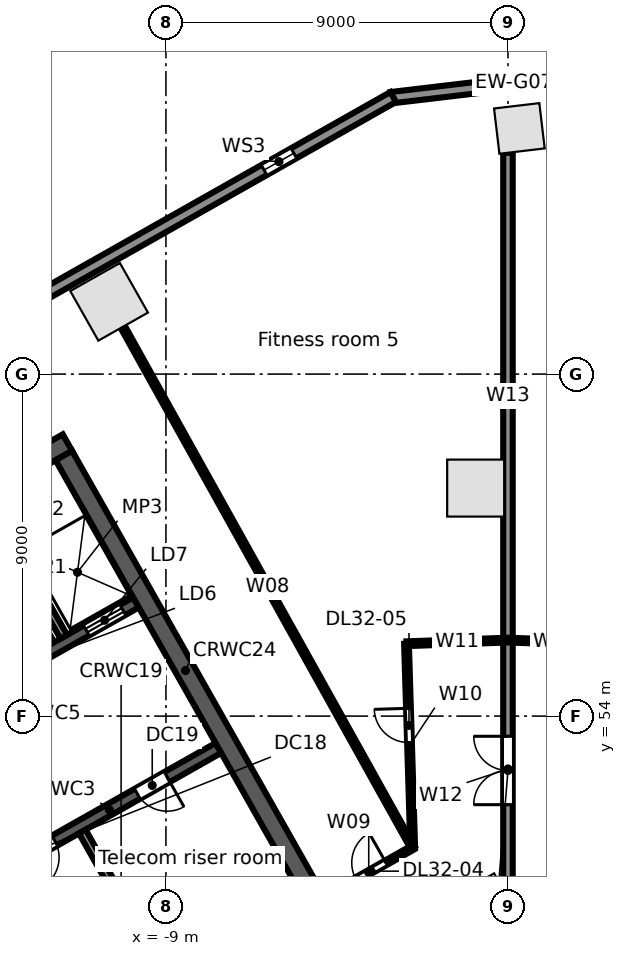
"""IFC4 building model, lengths in metres.
Left out: names, types, materials, properties, quantities, classifications, styles, units other than length and angle.
Written with IfcOpenShell. Run it as: python <this file> out.ifc"""

import sys

from ifc_helpers import new_model, si_unit, direction, frame, frame_2d, origin, origin_2d, place, context, subcontext, project, spatial, rectangle, extrude, element, fill, save


model = new_model("IFC4")
c1 = context("Model", 3, precision=1e-05, world=origin(), true_north=direction((0.0, 1.0)))
c2 = subcontext(c1, "Body", "Model", "MODEL_VIEW")
j1 = project(units=[si_unit("LENGTHUNIT", "METRE"), si_unit("PLANEANGLEUNIT", "RADIAN")], contexts=[c1])
p1 = place(None, origin())
s1 = spatial("IfcSite", under=j1, at=p1, CompositionType="ELEMENT")
p2 = place(p1, origin())
s2 = spatial("IfcBuilding", under=s1, at=p2, CompositionType="ELEMENT")
p3 = place(p2, frame((0.0, 0.0, 162.9)))
s3 = spatial("IfcBuildingStorey", under=s2, at=p3, CompositionType="ELEMENT", Elevation=162.9)
p4 = place(p3, frame((0.3, 69.464, 0.0), z_axis=(0.0, 0.0, 1.0), x_axis=(-0.993068456955, -0.117537397458, 0.0)))
e1 = element("IfcColumn", 1, at=p4, inside=s3, PredefinedType="COLUMN", context=c2, shape_type="SweptSolid", body=[
    extrude(rectangle(XDim=1.2, YDim=1.2, at=origin_2d()), origin(), (0.0, 0.0, 1.0), 4.0),
])
p5 = place(p3, frame((-10.495, 64.902, 0.0), z_axis=(0.0, 0.0, 1.0), x_axis=(-0.87035569594, -0.492423560103, 0.0)))
e2 = element("IfcColumn", 2, at=p5, inside=s3, PredefinedType="COLUMN", context=c2, shape_type="SweptSolid", body=[
    extrude(rectangle(XDim=1.5, YDim=1.5, at=origin_2d()), origin(), (0.0, 0.0, 1.0), 4.0),
])
p6 = place(p3, frame((-0.591, 49.044, 0.0), z_axis=(0.0, 0.0, 1.0), x_axis=(0.87035569594, 0.492423560103, 0.0)))
e3 = element("IfcColumn", 3, at=p6, inside=s3, PredefinedType="COLUMN", context=c2, shape_type="SweptSolid", body=[
    extrude(rectangle(XDim=1.2, YDim=1.2, at=origin_2d()), origin(), (0.0, 0.0, 1.0), 4.0),
])
p7 = place(p3, frame((-0.85, 60.0, 0.0), z_axis=(0.0, 0.0, 1.0), x_axis=(0.0, 1.0, 0.0)))
e4 = element("IfcColumn", 4, at=p7, inside=s3, PredefinedType="COLUMN", context=c2, shape_type="SweptSolid", body=[
    extrude(rectangle(XDim=1.5, YDim=1.5, at=origin_2d()), origin(), (0.0, 0.0, 1.0), 4.0),
])
p8 = place(p3, frame((-3.076, 70.273, 0.0), z_axis=(0.0, 0.0, 1.0), x_axis=(0.993067743007, 0.117543429416, 0.0)))
e5 = element("IfcWall", 5, at=p8, inside=s3, PredefinedType="STANDARD", context=c2, shape_type="SweptSolid", body=[
    extrude(rectangle(XDim=6.516, YDim=0.3, at=frame_2d((3.258, 0.0))), origin(), (0.0, 0.0, 1.0), 3.68),
])
p9 = place(p3, frame((-58.745, 38.764, 0.0), z_axis=(0.0, 0.0, 1.0), x_axis=(0.870355811726, 0.492423355453, 0.0)))
e6 = element("IfcWall", 6, at=p9, inside=s3, PredefinedType="STANDARD", context=c2, shape_type="SweptSolid", body=[
    extrude(rectangle(XDim=64.025, YDim=0.3, at=frame_2d((32.013, 0.0))), origin(), (0.0, 0.0, 1.0), 3.68),
])
p10 = place(p9, frame((60.122, 0.0, 0.6)))
e7 = element("IfcOpeningElement", 7, at=p10, cuts=e6, PredefinedType="OPENING", context=c2, shape_type="SweptSolid", body=[
    extrude(rectangle(XDim=0.9, YDim=2.4, at=frame_2d((0.45, 1.2))), frame((0.0, 0.16, 0.0), z_axis=(0.0, -1.0, 0.0), x_axis=(1.0, 0.0, 0.0)), (0.0, 0.0, 1.0), 0.32),
])
p11 = place(p9, frame((50.992, 0.0, 0.6)))
e8 = element("IfcOpeningElement", 8, at=p11, cuts=e6, PredefinedType="OPENING", context=c2, shape_type="SweptSolid", body=[
    extrude(rectangle(XDim=0.9, YDim=2.4, at=frame_2d((0.45, 1.2))), frame((0.0, 0.16, 0.0), z_axis=(0.0, -1.0, 0.0), x_axis=(1.0, 0.0, 0.0)), (0.0, 0.0, 1.0), 0.32),
])
p12 = place(p9, frame((41.862, 0.0, 0.6)))
e9 = element("IfcOpeningElement", 9, at=p12, cuts=e6, PredefinedType="OPENING", context=c2, shape_type="SweptSolid", body=[
    extrude(rectangle(XDim=0.9, YDim=2.4, at=frame_2d((0.45, 1.2))), frame((0.0, 0.16, 0.0), z_axis=(0.0, -1.0, 0.0), x_axis=(1.0, 0.0, 0.0)), (0.0, 0.0, 1.0), 0.32),
])
p13 = place(p9, frame((32.732, 0.0, 0.6)))
e10 = element("IfcOpeningElement", 10, at=p13, cuts=e6, PredefinedType="OPENING", context=c2, shape_type="SweptSolid", body=[
    extrude(rectangle(XDim=0.9, YDim=2.4, at=frame_2d((0.45, 1.2))), frame((0.0, 0.16, 0.0), z_axis=(0.0, -1.0, 0.0), x_axis=(1.0, 0.0, 0.0)), (0.0, 0.0, 1.0), 0.32),
])
p14 = place(p9, frame((23.602, 0.0, 0.6)))
e11 = element("IfcOpeningElement", 11, at=p14, cuts=e6, PredefinedType="OPENING", context=c2, shape_type="SweptSolid", body=[
    extrude(rectangle(XDim=0.9, YDim=2.4, at=frame_2d((0.45, 1.2))), frame((0.0, 0.16, 0.0), z_axis=(0.0, -1.0, 0.0), x_axis=(1.0, 0.0, 0.0)), (0.0, 0.0, 1.0), 0.32),
])
p15 = place(p9, frame((14.472, 0.0, 0.6)))
e12 = element("IfcOpeningElement", 12, at=p15, cuts=e6, PredefinedType="OPENING", context=c2, shape_type="SweptSolid", body=[
    extrude(rectangle(XDim=0.9, YDim=2.4, at=frame_2d((0.45, 1.2))), frame((0.0, 0.16, 0.0), z_axis=(0.0, -1.0, 0.0), x_axis=(1.0, 0.0, 0.0)), (0.0, 0.0, 1.0), 0.32),
])
p16 = place(p9, frame((5.342, 0.0, 0.6)))
e13 = element("IfcOpeningElement", 13, at=p16, cuts=e6, PredefinedType="OPENING", context=c2, shape_type="SweptSolid", body=[
    extrude(rectangle(XDim=0.9, YDim=2.4, at=frame_2d((0.45, 1.2))), frame((0.0, 0.16, 0.0), z_axis=(0.0, -1.0, 0.0), x_axis=(1.0, 0.0, 0.0)), (0.0, 0.0, 1.0), 0.32),
])
p17 = place(p3, frame((-13.365, 49.911, 0.0), z_axis=(0.0, 0.0, 1.0), x_axis=(0.870356769198, 0.492421663121, 0.0)))
e14 = element("IfcWall", 14, at=p17, inside=s3, PredefinedType="SOLIDWALL", context=c2, shape_type="SweptSolid", body=[
    extrude(rectangle(XDim=6.6, YDim=0.3, at=frame_2d((3.3, 0.0))), origin(), (0.0, 0.0, 1.0), 3.68),
])
p18 = place(p17, frame((0.75, 0.0, 0.0)))
e15 = element("IfcOpeningElement", 15, at=p18, cuts=e14, PredefinedType="OPENING", context=c2, shape_type="SweptSolid", body=[
    extrude(rectangle(XDim=0.9, YDim=2.1, at=frame_2d((0.45, 1.05))), frame((0.0, 0.16, 0.0), z_axis=(0.0, -1.0, 0.0), x_axis=(1.0, 0.0, 0.0)), (0.0, 0.0, 1.0), 0.32),
])
p19 = place(p17, frame((4.15, 0.0, 0.0)))
e16 = element("IfcOpeningElement", 16, at=p19, cuts=e14, PredefinedType="OPENING", context=c2, shape_type="SweptSolid", body=[
    extrude(rectangle(XDim=0.9, YDim=2.1, at=frame_2d((0.45, 1.05))), frame((0.0, 0.16, 0.0), z_axis=(0.0, -1.0, 0.0), x_axis=(1.0, 0.0, 0.0)), (0.0, 0.0, 1.0), 0.32),
])
p20 = place(p3, frame((-15.618, 53.691, 0.0), z_axis=(0.0, 0.0, 1.0), x_axis=(0.870363236066, 0.492410232738, 0.0)))
e17 = element("IfcWall", 17, at=p20, inside=s3, PredefinedType="SOLIDWALL", context=c2, shape_type="SweptSolid", body=[
    extrude(rectangle(XDim=6.7, YDim=0.3, at=frame_2d((3.35, 0.0))), origin(), (0.0, 0.0, 1.0), 3.68),
])
p21 = place(p20, frame((0.6, 0.0, 0.0)))
e18 = element("IfcOpeningElement", 18, at=p21, cuts=e17, PredefinedType="OPENING", context=c2, shape_type="SweptSolid", body=[
    extrude(rectangle(XDim=1.1, YDim=2.1, at=frame_2d((0.55, 1.05))), frame((0.0, 0.16, 0.0), z_axis=(0.0, -1.0, 0.0), x_axis=(1.0, 0.0, 0.0)), (0.0, 0.0, 1.0), 0.32),
])
p22 = place(p20, frame((2.9, 0.0, 0.0)))
e19 = element("IfcOpeningElement", 19, at=p22, cuts=e17, PredefinedType="OPENING", context=c2, shape_type="SweptSolid", body=[
    extrude(rectangle(XDim=1.1, YDim=2.1, at=frame_2d((0.55, 1.05))), frame((0.0, 0.16, 0.0), z_axis=(0.0, -1.0, 0.0), x_axis=(1.0, 0.0, 0.0)), (0.0, 0.0, 1.0), 0.32),
])
p23 = place(p20, frame((5.2, 0.0, 0.0)))
e20 = element("IfcOpeningElement", 20, at=p23, cuts=e17, PredefinedType="OPENING", context=c2, shape_type="SweptSolid", body=[
    extrude(rectangle(XDim=1.1, YDim=2.1, at=frame_2d((0.55, 1.05))), frame((0.0, 0.16, 0.0), z_axis=(0.0, -1.0, 0.0), x_axis=(1.0, 0.0, 0.0)), (0.0, 0.0, 1.0), 0.32),
])
p24 = place(p3, frame((-24.647, 53.811, 0.0), z_axis=(0.0, 0.0, 1.0), x_axis=(0.87034965173, 0.492434243055, 0.0)))
e21 = element("IfcWall", 21, at=p24, inside=s3, PredefinedType="SOLIDWALL", context=c2, shape_type="SweptSolid", body=[
    extrude(rectangle(XDim=15.0, YDim=0.5, at=frame_2d((7.5, 0.0))), origin(), (0.0, 0.0, 1.0), 3.68),
])
p25 = place(p3, frame((-13.291, 49.781, 0.0), z_axis=(0.0, 0.0, 1.0), x_axis=(0.492396453737, -0.870371031427, 0.0)))
e22 = element("IfcWall", 22, at=p25, inside=s3, PredefinedType="SOLIDWALL", context=c2, shape_type="SweptSolid", body=[
    extrude(rectangle(XDim=4.15, YDim=0.3, at=frame_2d((2.075, 0.0))), origin(), (0.0, 0.0, 1.0), 3.68),
])
p26 = place(p3, frame((-11.202, 50.962, 0.0), z_axis=(0.0, 0.0, 1.0), x_axis=(0.492441017253, -0.870345818929, 0.0)))
e23 = element("IfcWall", 23, at=p26, inside=s3, PredefinedType="PARTITIONING", context=c2, shape_type="SweptSolid", body=[
    extrude(rectangle(XDim=4.15, YDim=0.2, at=frame_2d((2.075, 0.0))), origin(), (0.0, 0.0, 1.0), 3.68),
])
p27 = place(p3, frame((-13.732, 59.699, 0.0), z_axis=(0.0, 0.0, 1.0), x_axis=(0.492396453737, -0.870371031427, 0.0)))
e24 = element("IfcWall", 24, at=p27, inside=s3, PredefinedType="SOLIDWALL", context=c2, shape_type="SweptSolid", body=[
    extrude(rectangle(XDim=4.15, YDim=0.2, at=frame_2d((2.075, 0.0))), origin(), (0.0, 0.0, 1.0), 3.68),
])
p28 = place(p3, frame((-11.687, 60.856, 0.0), z_axis=(0.0, 0.0, 1.0), x_axis=(0.492427267353, -0.870353598469, 0.0)))
e25 = element("IfcWall", 25, at=p28, inside=s3, PredefinedType="SOLIDWALL", context=c2, shape_type="SweptSolid", body=[
    extrude(rectangle(XDim=13.0, YDim=0.5, at=frame_2d((6.5, 0.0))), origin(), (0.0, 0.0, 1.0), 3.68),
])
p29 = place(p3, frame((-10.137, 64.243, 0.0), z_axis=(0.0, 0.0, 1.0), x_axis=(0.486452862603, -0.873706822948, 0.0)))
e26 = element("IfcWall", 26, at=p29, inside=s3, PredefinedType="PARTITIONING", context=c2, shape_type="SweptSolid", body=[
    extrude(rectangle(XDim=15.685, YDim=0.125, at=frame_2d((7.842, 0.0))), origin(), (0.0, 0.0, 1.0), 2.748),
])
p30 = place(p3, frame((-4.821, 49.23, 0.0), z_axis=(0.0, 0.0, 1.0), x_axis=(0.870371217631, 0.492396124598, 0.0)))
e27 = element("IfcWall", 27, at=p30, inside=s3, PredefinedType="PARTITIONING", context=c2, shape_type="SweptSolid", body=[
    extrude(rectangle(XDim=2.659, YDim=0.125, at=frame_2d((1.329, 0.0))), origin(), (0.0, 0.0, 1.0), 3.68),
])
p31 = place(p30, frame((0.95, 0.0, 0.0)))
e28 = element("IfcOpeningElement", 28, at=p31, cuts=e27, PredefinedType="OPENING", context=c2, shape_type="SweptSolid", body=[
    extrude(rectangle(XDim=0.9, YDim=2.1, at=frame_2d((0.45, 1.05))), frame((0.0, 0.073, 0.0), z_axis=(0.0, -1.0, 0.0), x_axis=(1.0, 0.0, 0.0)), (0.0, 0.0, 1.0), 0.145),
])
p32 = place(p3, frame((-2.67, 55.904, 0.0), z_axis=(0.0, 0.0, 1.0), x_axis=(0.030338701418, -0.999539675649, 0.0)))
e29 = element("IfcWall", 29, at=p32, inside=s3, PredefinedType="PARTITIONING", context=c2, shape_type="SweptSolid", body=[
    extrude(rectangle(XDim=5.367, YDim=0.125, at=frame_2d((2.684, 0.0))), origin(), (0.0, 0.0, 1.0), 3.68),
])
p33 = place(p32, frame((1.7, 0.0, 0.0)))
e30 = element("IfcOpeningElement", 30, at=p33, cuts=e29, PredefinedType="OPENING", context=c2, shape_type="SweptSolid", body=[
    extrude(rectangle(XDim=0.9, YDim=2.1, at=frame_2d((0.45, 1.05))), frame((0.0, 0.073, 0.0), z_axis=(0.0, -1.0, 0.0), x_axis=(1.0, 0.0, 0.0)), (0.0, 0.0, 1.0), 0.145),
])
p34 = place(p3, frame((-2.67, 55.904, 0.0), z_axis=(0.0, 0.0, 1.0), x_axis=(0.999354913865, 0.03591317494, 0.0)))
e31 = element("IfcWall", 31, at=p34, inside=s3, PredefinedType="PARTITIONING", context=c2, shape_type="SweptSolid", body=[
    extrude(rectangle(XDim=2.672, YDim=0.125, at=frame_2d((1.336, 0.0))), origin(), (0.0, 0.0, 1.0), 2.748),
])
p35 = place(p3, frame((0.0, 49.219, 0.0), z_axis=(0.0, 0.0, 1.0), x_axis=(0.0, 1.0, 0.0)))
e32 = element("IfcWall", 32, at=p35, inside=s3, PredefinedType="PARTITIONING", context=c2, shape_type="SweptSolid", body=[
    extrude(rectangle(XDim=6.781, YDim=0.25, at=frame_2d((3.391, 0.0))), origin(), (0.0, 0.0, 1.0), 3.68),
])
p36 = place(p35, frame((2.45, 0.0, 0.0)))
e33 = element("IfcOpeningElement", 33, at=p36, cuts=e32, PredefinedType="OPENING", context=c2, shape_type="SweptSolid", body=[
    extrude(rectangle(XDim=1.8, YDim=2.1, at=frame_2d((0.9, 1.05))), frame((0.0, 0.135, 0.0), z_axis=(0.0, -1.0, 0.0), x_axis=(1.0, 0.0, 0.0)), (0.0, 0.0, 1.0), 0.27),
])
p37 = place(p3, frame((0.0, 56.0, 0.0), z_axis=(0.0, 0.0, 1.0), x_axis=(0.0, 1.0, 0.0)))
e34 = element("IfcWall", 34, at=p37, inside=s3, PredefinedType="PARTITIONING", context=c2, shape_type="SweptSolid", body=[
    extrude(rectangle(XDim=12.824, YDim=0.25, at=frame_2d((6.412, 0.0))), origin(), (0.0, 0.0, 1.0), 2.748),
])
p38 = place(p3, frame((0.0, 56.0, 0.0), z_axis=(0.0, 0.0, 1.0), x_axis=(0.999349313684, -0.036068673934, 0.0)))
e35 = element("IfcWall", 35, at=p38, inside=s3, PredefinedType="PARTITIONING", context=c2, shape_type="SweptSolid", body=[
    extrude(rectangle(XDim=2.471, YDim=0.125, at=frame_2d((1.235, 0.0))), origin(), (0.0, 0.0, 1.0), 3.68),
])
p39 = place(p10, origin())
e36 = element("IfcWindow", 36, at=p39, inside=s3, PartitioningType="SINGLE_PANEL", PredefinedType="WINDOW", context=c2, shape_type="SweptSolid", body=[
    extrude(rectangle(XDim=0.9, YDim=2.4, at=frame_2d((0.45, 1.2))), frame((0.0, 0.03, 0.0), z_axis=(0.0, -1.0, 0.0), x_axis=(1.0, 0.0, 0.0)), (0.0, 0.0, 1.0), 0.06),
])
fill(e7, e36)
p40 = place(p23, origin())
e37 = element("IfcDoor", 37, at=p40, inside=s3, OperationType="DOUBLE_DOOR_SLIDING", PredefinedType="DOOR", context=c2, shape_type="SweptSolid", body=[
    extrude(rectangle(XDim=1.1, YDim=2.1, at=frame_2d((0.55, 1.05))), frame((0.0, 0.025, 0.0), z_axis=(0.0, -1.0, 0.0), x_axis=(1.0, 0.0, 0.0)), (0.0, 0.0, 1.0), 0.05),
])
fill(e20, e37)
p41 = place(p18, frame((0.9, 0.0, 0.0), z_axis=(0.0, 0.0, 1.0), x_axis=(-1.0, 0.0, 0.0)))
e38 = element("IfcDoor", 38, at=p41, inside=s3, OperationType="SINGLE_SWING_RIGHT", PredefinedType="DOOR", context=c2, shape_type="SweptSolid", body=[
    extrude(rectangle(XDim=0.9, YDim=2.1, at=frame_2d((0.45, 1.05))), frame((0.0, 0.025, 0.0), z_axis=(0.0, -1.0, 0.0), x_axis=(1.0, 0.0, 0.0)), (0.0, 0.0, 1.0), 0.05),
])
fill(e15, e38)
p42 = place(p19, frame((0.9, 0.0, 0.0), z_axis=(0.0, 0.0, 1.0), x_axis=(-1.0, 0.0, 0.0)))
e39 = element("IfcDoor", 39, at=p42, inside=s3, OperationType="SINGLE_SWING_LEFT", PredefinedType="DOOR", context=c2, shape_type="SweptSolid", body=[
    extrude(rectangle(XDim=0.9, YDim=2.1, at=frame_2d((0.45, 1.05))), frame((0.0, 0.025, 0.0), z_axis=(0.0, -1.0, 0.0), x_axis=(1.0, 0.0, 0.0)), (0.0, 0.0, 1.0), 0.05),
])
fill(e16, e39)
p43 = place(p31, origin())
e40 = element("IfcDoor", 40, at=p43, inside=s3, OperationType="SINGLE_SWING_RIGHT", PredefinedType="DOOR", context=c2, shape_type="SweptSolid", body=[
    extrude(rectangle(XDim=0.9, YDim=2.1, at=frame_2d((0.45, 1.05))), frame((0.0, 0.025, 0.0), z_axis=(0.0, -1.0, 0.0), x_axis=(1.0, 0.0, 0.0)), (0.0, 0.0, 1.0), 0.05),
])
fill(e28, e40)
p44 = place(p33, frame((0.9, 0.0, 0.0), z_axis=(0.0, 0.0, 1.0), x_axis=(-1.0, 0.0, 0.0)))
e41 = element("IfcDoor", 41, at=p44, inside=s3, OperationType="SINGLE_SWING_RIGHT", PredefinedType="DOOR", context=c2, shape_type="SweptSolid", body=[
    extrude(rectangle(XDim=0.9, YDim=2.1, at=frame_2d((0.45, 1.05))), frame((0.0, 0.025, 0.0), z_axis=(0.0, -1.0, 0.0), x_axis=(1.0, 0.0, 0.0)), (0.0, 0.0, 1.0), 0.05),
])
fill(e30, e41)
p45 = place(p36, origin())
e42 = element("IfcDoor", 42, at=p45, inside=s3, OperationType="DOUBLE_DOOR_SINGLE_SWING", PredefinedType="DOOR", context=c2, shape_type="SweptSolid", body=[
    extrude(rectangle(XDim=1.8, YDim=2.1, at=frame_2d((0.9, 1.05))), frame((0.0, 0.025, 0.0), z_axis=(0.0, -1.0, 0.0), x_axis=(1.0, 0.0, 0.0)), (0.0, 0.0, 1.0), 0.05),
])
fill(e33, e42)
save(model, sys.argv[1])
